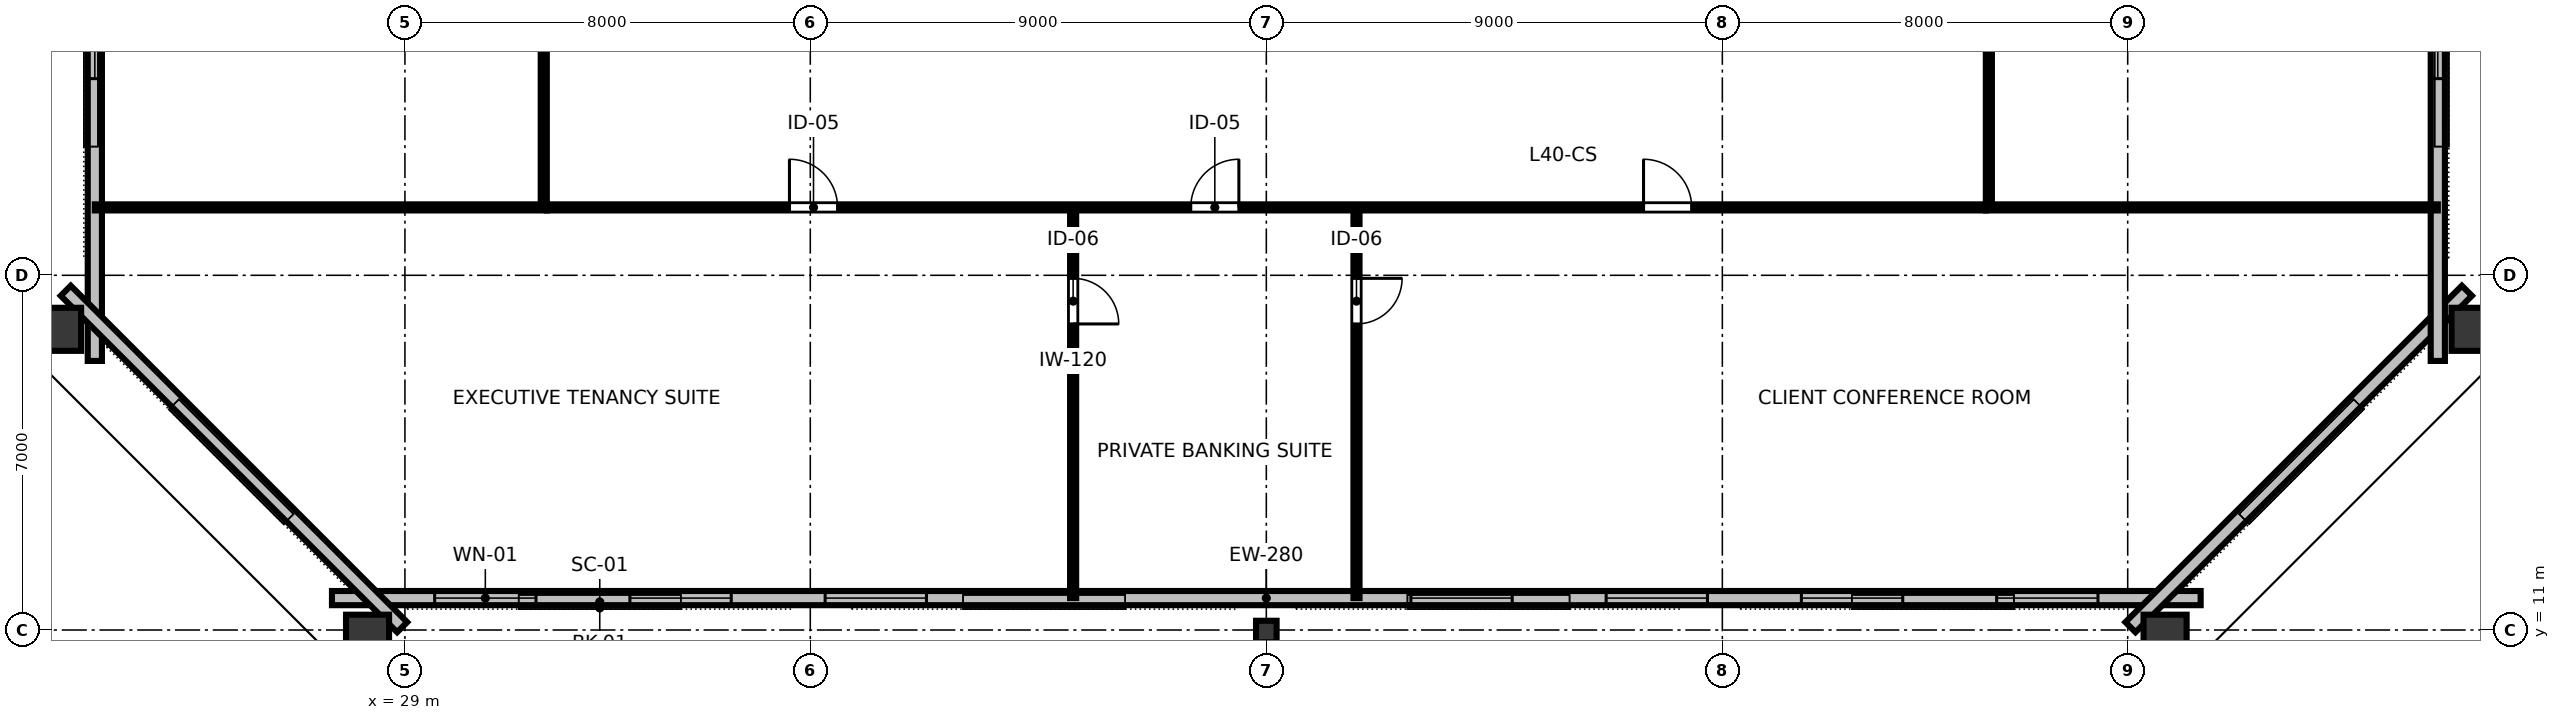
"""IFC4 building model, lengths in metres.
Left out: names, types, materials, properties, quantities, classifications, styles, units other than length and angle.
Written with IfcOpenShell. Run it as: python <this file> out.ifc"""

import sys

from ifc_helpers import new_model, si_unit, direction, frame, frame_2d, origin, origin_2d, place, context, subcontext, project, spatial, rectangle, hollow_rectangle, i_section, extrude, element, fill, save


model = new_model("IFC4")
c1 = context("Model", 3, precision=1e-05, world=origin(), true_north=direction((0.0, 1.0)))
c2 = subcontext(c1, "Body", "Model", "MODEL_VIEW")
j1 = project(units=[si_unit("LENGTHUNIT", "METRE"), si_unit("PLANEANGLEUNIT", "RADIAN")], contexts=[c1])
p1 = place(None, origin())
s1 = spatial("IfcSite", under=j1, at=p1, CompositionType="ELEMENT")
p2 = place(p1, origin())
s2 = spatial("IfcBuilding", under=s1, at=p2, CompositionType="ELEMENT")
p3 = place(p2, frame((0.0, 0.0, 152.8)))
s3 = spatial("IfcBuildingStorey", under=s2, at=p3, CompositionType="ELEMENT", Elevation=152.8)
p4 = place(p3, frame((28.262, 10.802, 0.0), z_axis=(0.0, 0.0, 1.0), x_axis=(1.0, 0.0, 0.0)))
e1 = element("IfcColumn", 1, at=p4, inside=s3, PredefinedType="COLUMN", context=c2, shape_type="SweptSolid", body=[
    extrude(hollow_rectangle(XDim=0.85, YDim=1.0, WallThickness=0.05, at=origin_2d()), origin(), (0.0, 0.0, 1.0), 3.358),
])
p5 = place(p3, frame((46.0, 10.97, 0.0), z_axis=(0.0, 0.0, 1.0), x_axis=(1.0, 0.0, 0.0)))
e2 = element("IfcColumn", 2, at=p5, inside=s3, PredefinedType="COLUMN", context=c2, shape_type="SweptSolid", body=[
    extrude(i_section(OverallWidth=0.406, OverallDepth=0.425, WebThickness=0.033, FlangeThickness=0.052, FilletRadius=0.025, at=origin_2d()), origin(), (0.0, 0.0, 1.0), 3.358),
])
for number, where, z_axis, x_axis in (
    (3, (63.738, 10.802, 0.0), (0.0, 0.0, 1.0), (1.0, 0.0, 0.0)),
    (4, (69.891, 16.934, 0.0), (0.0, 0.0, 1.0), (0.0, 1.0, 0.0)),
    (5, (22.109, 16.934, 0.0), (0.0, 0.0, 1.0), (0.0, 1.0, 0.0)),
):
    element("IfcColumn", number, at=place(p3, frame(where, z_axis=z_axis, x_axis=x_axis)), inside=s3, PredefinedType="COLUMN", context=c2, shape_type="SweptSolid", body=[
        extrude(hollow_rectangle(XDim=0.85, YDim=1.0, WallThickness=0.05, at=origin_2d()), origin(), (0.0, 0.0, 1.0), 3.358),
    ])
p6 = place(p3, frame((27.56, 11.63, 0.0), z_axis=(0.0, 0.0, 1.0), x_axis=(1.0, 0.0, 0.0)))
e6 = element("IfcWall", 6, at=p6, inside=s3, PredefinedType="STANDARD", context=c2, shape_type="SweptSolid", body=[
    extrude(rectangle(XDim=36.88, YDim=0.28, at=frame_2d((18.44, 0.0))), origin(), (0.0, 0.0, 1.0), 3.36),
])
p7 = place(p6, frame((2.027, 0.0, 0.8)))
e7 = element("IfcOpeningElement", 7, at=p7, cuts=e6, PredefinedType="OPENING", context=c2, shape_type="SweptSolid", body=[
    extrude(rectangle(XDim=2.0, YDim=1.95, at=frame_2d((1.0, 0.975))), frame((0.0, 0.15, 0.0), z_axis=(0.0, -1.0, 0.0), x_axis=(1.0, 0.0, 0.0)), (0.0, 0.0, 1.0), 0.3),
])
p8 = place(p6, frame((5.88, 0.0, 0.8)))
e8 = element("IfcOpeningElement", 8, at=p8, cuts=e6, PredefinedType="OPENING", context=c2, shape_type="SweptSolid", body=[
    extrude(rectangle(XDim=2.0, YDim=1.95, at=frame_2d((1.0, 0.975))), frame((0.0, 0.15, 0.0), z_axis=(0.0, -1.0, 0.0), x_axis=(1.0, 0.0, 0.0)), (0.0, 0.0, 1.0), 0.3),
])
p9 = place(p6, frame((9.733, 0.0, 0.8)))
e9 = element("IfcOpeningElement", 9, at=p9, cuts=e6, PredefinedType="OPENING", context=c2, shape_type="SweptSolid", body=[
    extrude(rectangle(XDim=2.0, YDim=1.95, at=frame_2d((1.0, 0.975))), frame((0.0, 0.15, 0.0), z_axis=(0.0, -1.0, 0.0), x_axis=(1.0, 0.0, 0.0)), (0.0, 0.0, 1.0), 0.3),
])
p10 = place(p6, frame((21.293, 0.0, 0.8)))
e10 = element("IfcOpeningElement", 10, at=p10, cuts=e6, PredefinedType="OPENING", context=c2, shape_type="SweptSolid", body=[
    extrude(rectangle(XDim=2.0, YDim=1.95, at=frame_2d((1.0, 0.975))), frame((0.0, 0.15, 0.0), z_axis=(0.0, -1.0, 0.0), x_axis=(1.0, 0.0, 0.0)), (0.0, 0.0, 1.0), 0.3),
])
p11 = place(p6, frame((25.147, 0.0, 0.8)))
e11 = element("IfcOpeningElement", 11, at=p11, cuts=e6, PredefinedType="OPENING", context=c2, shape_type="SweptSolid", body=[
    extrude(rectangle(XDim=2.0, YDim=1.95, at=frame_2d((1.0, 0.975))), frame((0.0, 0.15, 0.0), z_axis=(0.0, -1.0, 0.0), x_axis=(1.0, 0.0, 0.0)), (0.0, 0.0, 1.0), 0.3),
])
p12 = place(p6, frame((29.0, 0.0, 0.8)))
e12 = element("IfcOpeningElement", 12, at=p12, cuts=e6, PredefinedType="OPENING", context=c2, shape_type="SweptSolid", body=[
    extrude(rectangle(XDim=2.0, YDim=1.95, at=frame_2d((1.0, 0.975))), frame((0.0, 0.15, 0.0), z_axis=(0.0, -1.0, 0.0), x_axis=(1.0, 0.0, 0.0)), (0.0, 0.0, 1.0), 0.3),
])
p13 = place(p6, frame((32.853, 0.0, 0.8)))
e13 = element("IfcOpeningElement", 13, at=p13, cuts=e6, PredefinedType="OPENING", context=c2, shape_type="SweptSolid", body=[
    extrude(rectangle(XDim=2.0, YDim=1.95, at=frame_2d((1.0, 0.975))), frame((0.0, 0.15, 0.0), z_axis=(0.0, -1.0, 0.0), x_axis=(1.0, 0.0, 0.0)), (0.0, 0.0, 1.0), 0.3),
])
p14 = place(p3, frame((63.054, 11.056, 0.0), z_axis=(0.0, 0.0, 1.0), x_axis=(0.707106781187, 0.707106781187, 0.0)))
e14 = element("IfcWall", 14, at=p14, inside=s3, PredefinedType="STANDARD", context=c2, shape_type="SweptSolid", body=[
    extrude(rectangle(XDim=9.39, YDim=0.28, at=frame_2d((4.695, 0.0))), origin(), (0.0, 0.0, 1.0), 3.36),
])
p15 = place(p3, frame((69.12, 16.31, 0.0), z_axis=(0.0, 0.0, 1.0), x_axis=(0.0, 1.0, 0.0)))
e15 = element("IfcWall", 15, at=p15, inside=s3, PredefinedType="STANDARD", context=c2, shape_type="SweptSolid", body=[
    extrude(rectangle(XDim=31.38, YDim=0.28, at=frame_2d((15.69, 0.0))), origin(), (0.0, 0.0, 1.0), 3.36),
])
p16 = place(p15, frame((5.571, 0.0, 0.8)))
e16 = element("IfcOpeningElement", 16, at=p16, cuts=e15, PredefinedType="OPENING", context=c2, shape_type="SweptSolid", body=[
    extrude(rectangle(XDim=2.0, YDim=1.95, at=frame_2d((1.0, 0.975))), frame((0.0, 0.15, 0.0), z_axis=(0.0, -1.0, 0.0), x_axis=(1.0, 0.0, 0.0)), (0.0, 0.0, 1.0), 0.3),
])
p17 = place(p15, frame((9.219, 0.0, 0.8)))
e17 = element("IfcOpeningElement", 17, at=p17, cuts=e15, PredefinedType="OPENING", context=c2, shape_type="SweptSolid", body=[
    extrude(rectangle(XDim=2.0, YDim=1.95, at=frame_2d((1.0, 0.975))), frame((0.0, 0.15, 0.0), z_axis=(0.0, -1.0, 0.0), x_axis=(1.0, 0.0, 0.0)), (0.0, 0.0, 1.0), 0.3),
])
p18 = place(p15, frame((20.161, 0.0, 0.8)))
e18 = element("IfcOpeningElement", 18, at=p18, cuts=e15, PredefinedType="OPENING", context=c2, shape_type="SweptSolid", body=[
    extrude(rectangle(XDim=2.0, YDim=1.95, at=frame_2d((1.0, 0.975))), frame((0.0, 0.15, 0.0), z_axis=(0.0, -1.0, 0.0), x_axis=(1.0, 0.0, 0.0)), (0.0, 0.0, 1.0), 0.3),
])
p19 = place(p15, frame((23.809, 0.0, 0.8)))
e19 = element("IfcOpeningElement", 19, at=p19, cuts=e15, PredefinedType="OPENING", context=c2, shape_type="SweptSolid", body=[
    extrude(rectangle(XDim=2.0, YDim=1.95, at=frame_2d((1.0, 0.975))), frame((0.0, 0.15, 0.0), z_axis=(0.0, -1.0, 0.0), x_axis=(1.0, 0.0, 0.0)), (0.0, 0.0, 1.0), 0.3),
])
p20 = place(p3, frame((22.88, 47.69, 0.0), z_axis=(0.0, 0.0, 1.0), x_axis=(0.0, -1.0, 0.0)))
e20 = element("IfcWall", 20, at=p20, inside=s3, PredefinedType="STANDARD", context=c2, shape_type="SweptSolid", body=[
    extrude(rectangle(XDim=31.38, YDim=0.28, at=frame_2d((15.69, 0.0))), origin(), (0.0, 0.0, 1.0), 3.36),
])
p21 = place(p20, frame((5.571, 0.0, 0.8)))
e21 = element("IfcOpeningElement", 21, at=p21, cuts=e20, PredefinedType="OPENING", context=c2, shape_type="SweptSolid", body=[
    extrude(rectangle(XDim=2.0, YDim=1.95, at=frame_2d((1.0, 0.975))), frame((0.0, 0.15, 0.0), z_axis=(0.0, -1.0, 0.0), x_axis=(1.0, 0.0, 0.0)), (0.0, 0.0, 1.0), 0.3),
])
p22 = place(p20, frame((20.161, 0.0, 0.8)))
e22 = element("IfcOpeningElement", 22, at=p22, cuts=e20, PredefinedType="OPENING", context=c2, shape_type="SweptSolid", body=[
    extrude(rectangle(XDim=2.0, YDim=1.95, at=frame_2d((1.0, 0.975))), frame((0.0, 0.15, 0.0), z_axis=(0.0, -1.0, 0.0), x_axis=(1.0, 0.0, 0.0)), (0.0, 0.0, 1.0), 0.3),
])
p23 = place(p20, frame((23.809, 0.0, 0.8)))
e23 = element("IfcOpeningElement", 23, at=p23, cuts=e20, PredefinedType="OPENING", context=c2, shape_type="SweptSolid", body=[
    extrude(rectangle(XDim=2.0, YDim=1.95, at=frame_2d((1.0, 0.975))), frame((0.0, 0.15, 0.0), z_axis=(0.0, -1.0, 0.0), x_axis=(1.0, 0.0, 0.0)), (0.0, 0.0, 1.0), 0.3),
])
p24 = place(p3, frame((22.306, 17.696, 0.0), z_axis=(0.0, 0.0, 1.0), x_axis=(0.707106781187, -0.707106781187, 0.0)))
e24 = element("IfcWall", 24, at=p24, inside=s3, PredefinedType="STANDARD", context=c2, shape_type="SweptSolid", body=[
    extrude(rectangle(XDim=9.39, YDim=0.28, at=frame_2d((4.695, 0.0))), origin(), (0.0, 0.0, 1.0), 3.36),
])
p25 = place(p3, frame((42.188, 19.34, 0.0), z_axis=(0.0, 0.0, 1.0), x_axis=(0.0, -1.0, 0.0)))
e25 = element("IfcWall", 25, at=p25, inside=s3, PredefinedType="PARTITIONING", context=c2, shape_type="SweptSolid", body=[
    extrude(rectangle(XDim=7.71, YDim=0.12, at=frame_2d((3.855, 0.0))), origin(), (0.0, 0.0, 1.0), 2.64),
])
p26 = place(p25, frame((1.4, 0.0, 0.0)))
e26 = element("IfcOpeningElement", 26, at=p26, cuts=e25, PredefinedType="OPENING", context=c2, shape_type="SweptSolid", body=[
    extrude(rectangle(XDim=0.9, YDim=2.15, at=frame_2d((0.45, 1.075))), frame((0.0, 0.07, 0.0), z_axis=(0.0, -1.0, 0.0), x_axis=(1.0, 0.0, 0.0)), (0.0, 0.0, 1.0), 0.14),
])
p27 = place(p3, frame((47.78, 19.34, 0.0), z_axis=(0.0, 0.0, 1.0), x_axis=(0.0, -1.0, 0.0)))
e27 = element("IfcWall", 27, at=p27, inside=s3, PredefinedType="PARTITIONING", context=c2, shape_type="SweptSolid", body=[
    extrude(rectangle(XDim=7.71, YDim=0.12, at=frame_2d((3.855, 0.0))), origin(), (0.0, 0.0, 1.0), 2.64),
])
p28 = place(p27, frame((1.4, 0.0, 0.0)))
e28 = element("IfcOpeningElement", 28, at=p28, cuts=e27, PredefinedType="OPENING", context=c2, shape_type="SweptSolid", body=[
    extrude(rectangle(XDim=0.9, YDim=2.15, at=frame_2d((0.45, 1.075))), frame((0.0, 0.07, 0.0), z_axis=(0.0, -1.0, 0.0), x_axis=(1.0, 0.0, 0.0)), (0.0, 0.0, 1.0), 0.14),
])
p29 = place(p3, frame((31.8, 19.34, 0.0), z_axis=(0.0, 0.0, 1.0), x_axis=(1.0, 0.0, 0.0)))
e29 = element("IfcWall", 29, at=p29, inside=s3, PredefinedType="PARTITIONING", context=c2, shape_type="SweptSolid", body=[
    extrude(rectangle(XDim=28.4, YDim=0.12, at=frame_2d((14.2, 0.0))), origin(), (0.0, 0.0, 1.0), 2.64),
])
p30 = place(p29, frame((4.789, 0.0, 0.0)))
e30 = element("IfcOpeningElement", 30, at=p30, cuts=e29, PredefinedType="OPENING", context=c2, shape_type="SweptSolid", body=[
    extrude(rectangle(XDim=0.95, YDim=2.15, at=frame_2d((0.475, 1.075))), frame((0.0, 0.07, 0.0), z_axis=(0.0, -1.0, 0.0), x_axis=(1.0, 0.0, 0.0)), (0.0, 0.0, 1.0), 0.14),
])
p31 = place(p29, frame((12.708, 0.0, 0.0)))
e31 = element("IfcOpeningElement", 31, at=p31, cuts=e29, PredefinedType="OPENING", context=c2, shape_type="SweptSolid", body=[
    extrude(rectangle(XDim=0.95, YDim=2.15, at=frame_2d((0.475, 1.075))), frame((0.0, 0.07, 0.0), z_axis=(0.0, -1.0, 0.0), x_axis=(1.0, 0.0, 0.0)), (0.0, 0.0, 1.0), 0.14),
])
p32 = place(p29, frame((21.645, 0.0, 0.0)))
e32 = element("IfcOpeningElement", 32, at=p32, cuts=e29, PredefinedType="OPENING", context=c2, shape_type="SweptSolid", body=[
    extrude(rectangle(XDim=0.95, YDim=2.15, at=frame_2d((0.475, 1.075))), frame((0.0, 0.07, 0.0), z_axis=(0.0, -1.0, 0.0), x_axis=(1.0, 0.0, 0.0)), (0.0, 0.0, 1.0), 0.14),
])
p33 = place(p3, frame((31.74, 19.4, 0.0), z_axis=(0.0, 0.0, 1.0), x_axis=(0.0, 1.0, 0.0)))
e33 = element("IfcWall", 33, at=p33, inside=s3, PredefinedType="PARTITIONING", context=c2, shape_type="SweptSolid", body=[
    extrude(rectangle(XDim=11.58, YDim=0.12, at=frame_2d((5.79, 0.0))), origin(), (0.0, 0.0, 1.0), 2.64),
])
p34 = place(p33, frame((5.415, 0.0, 0.0)))
e34 = element("IfcOpeningElement", 34, at=p34, cuts=e33, PredefinedType="OPENING", context=c2, shape_type="SweptSolid", body=[
    extrude(rectangle(XDim=0.95, YDim=2.15, at=frame_2d((0.475, 1.075))), frame((0.0, 0.07, 0.0), z_axis=(0.0, -1.0, 0.0), x_axis=(1.0, 0.0, 0.0)), (0.0, 0.0, 1.0), 0.14),
])
p35 = place(p3, frame((60.26, 19.4, 0.0), z_axis=(0.0, 0.0, 1.0), x_axis=(0.0, 1.0, 0.0)))
e35 = element("IfcWall", 35, at=p35, inside=s3, PredefinedType="PARTITIONING", context=c2, shape_type="SweptSolid", body=[
    extrude(rectangle(XDim=11.58, YDim=0.12, at=frame_2d((5.79, 0.0))), origin(), (0.0, 0.0, 1.0), 2.64),
])
p36 = place(p35, frame((5.415, 0.0, 0.0)))
e36 = element("IfcOpeningElement", 36, at=p36, cuts=e35, PredefinedType="OPENING", context=c2, shape_type="SweptSolid", body=[
    extrude(rectangle(XDim=0.95, YDim=2.15, at=frame_2d((0.475, 1.075))), frame((0.0, 0.07, 0.0), z_axis=(0.0, -1.0, 0.0), x_axis=(1.0, 0.0, 0.0)), (0.0, 0.0, 1.0), 0.14),
])
for number, where, z_axis, x_axis in (
    (37, (31.8, 19.34, 0.0), (0.0, 0.0, 1.0), (-1.0, 0.0, 0.0)),
    (38, (60.2, 19.34, 0.0), (0.0, 0.0, 1.0), (1.0, 0.0, 0.0)),
):
    element("IfcWall", number, at=place(p3, frame(where, z_axis=z_axis, x_axis=x_axis)), inside=s3, PredefinedType="PARTITIONING", context=c2, shape_type="SweptSolid", body=[
        extrude(rectangle(XDim=8.92, YDim=0.12, at=frame_2d((4.46, 0.0))), origin(), (0.0, 0.0, 1.0), 2.64),
    ])
p37 = place(p7, origin())
e39 = element("IfcWindow", 39, at=p37, inside=s3, PartitioningType="SINGLE_PANEL", PredefinedType="WINDOW", context=c2, shape_type="SweptSolid", body=[
    extrude(rectangle(XDim=2.0, YDim=1.95, at=frame_2d((1.0, 0.975))), frame((0.0, 0.03, 0.0), z_axis=(0.0, -1.0, 0.0), x_axis=(1.0, 0.0, 0.0)), (0.0, 0.0, 1.0), 0.06),
])
fill(e7, e39)
p38 = place(p8, origin())
e40 = element("IfcWindow", 40, at=p38, inside=s3, PartitioningType="SINGLE_PANEL", PredefinedType="WINDOW", context=c2, shape_type="SweptSolid", body=[
    extrude(rectangle(XDim=2.0, YDim=1.95, at=frame_2d((1.0, 0.975))), frame((0.0, 0.03, 0.0), z_axis=(0.0, -1.0, 0.0), x_axis=(1.0, 0.0, 0.0)), (0.0, 0.0, 1.0), 0.06),
])
fill(e8, e40)
p39 = place(p9, origin())
e41 = element("IfcWindow", 41, at=p39, inside=s3, PartitioningType="SINGLE_PANEL", PredefinedType="WINDOW", context=c2, shape_type="SweptSolid", body=[
    extrude(rectangle(XDim=2.0, YDim=1.95, at=frame_2d((1.0, 0.975))), frame((0.0, 0.03, 0.0), z_axis=(0.0, -1.0, 0.0), x_axis=(1.0, 0.0, 0.0)), (0.0, 0.0, 1.0), 0.06),
])
fill(e9, e41)
p40 = place(p10, origin())
e42 = element("IfcWindow", 42, at=p40, inside=s3, PartitioningType="SINGLE_PANEL", PredefinedType="WINDOW", context=c2, shape_type="SweptSolid", body=[
    extrude(rectangle(XDim=2.0, YDim=1.95, at=frame_2d((1.0, 0.975))), frame((0.0, 0.03, 0.0), z_axis=(0.0, -1.0, 0.0), x_axis=(1.0, 0.0, 0.0)), (0.0, 0.0, 1.0), 0.06),
])
fill(e10, e42)
p41 = place(p11, origin())
e43 = element("IfcWindow", 43, at=p41, inside=s3, PartitioningType="SINGLE_PANEL", PredefinedType="WINDOW", context=c2, shape_type="SweptSolid", body=[
    extrude(rectangle(XDim=2.0, YDim=1.95, at=frame_2d((1.0, 0.975))), frame((0.0, 0.03, 0.0), z_axis=(0.0, -1.0, 0.0), x_axis=(1.0, 0.0, 0.0)), (0.0, 0.0, 1.0), 0.06),
])
fill(e11, e43)
p42 = place(p12, origin())
e44 = element("IfcWindow", 44, at=p42, inside=s3, PartitioningType="SINGLE_PANEL", PredefinedType="WINDOW", context=c2, shape_type="SweptSolid", body=[
    extrude(rectangle(XDim=2.0, YDim=1.95, at=frame_2d((1.0, 0.975))), frame((0.0, 0.03, 0.0), z_axis=(0.0, -1.0, 0.0), x_axis=(1.0, 0.0, 0.0)), (0.0, 0.0, 1.0), 0.06),
])
fill(e12, e44)
p43 = place(p13, origin())
e45 = element("IfcWindow", 45, at=p43, inside=s3, PartitioningType="SINGLE_PANEL", PredefinedType="WINDOW", context=c2, shape_type="SweptSolid", body=[
    extrude(rectangle(XDim=2.0, YDim=1.95, at=frame_2d((1.0, 0.975))), frame((0.0, 0.03, 0.0), z_axis=(0.0, -1.0, 0.0), x_axis=(1.0, 0.0, 0.0)), (0.0, 0.0, 1.0), 0.06),
])
fill(e13, e45)
p44 = place(p16, origin())
e46 = element("IfcWindow", 46, at=p44, inside=s3, PartitioningType="SINGLE_PANEL", PredefinedType="WINDOW", context=c2, shape_type="SweptSolid", body=[
    extrude(rectangle(XDim=2.0, YDim=1.95, at=frame_2d((1.0, 0.975))), frame((0.0, 0.03, 0.0), z_axis=(0.0, -1.0, 0.0), x_axis=(1.0, 0.0, 0.0)), (0.0, 0.0, 1.0), 0.06),
])
fill(e16, e46)
p45 = place(p23, origin())
e47 = element("IfcWindow", 47, at=p45, inside=s3, PartitioningType="SINGLE_PANEL", PredefinedType="WINDOW", context=c2, shape_type="SweptSolid", body=[
    extrude(rectangle(XDim=2.0, YDim=1.95, at=frame_2d((1.0, 0.975))), frame((0.0, 0.03, 0.0), z_axis=(0.0, -1.0, 0.0), x_axis=(1.0, 0.0, 0.0)), (0.0, 0.0, 1.0), 0.06),
])
fill(e23, e47)
p46 = place(p26, origin())
e48 = element("IfcDoor", 48, at=p46, inside=s3, OperationType="SINGLE_SWING_RIGHT", PredefinedType="DOOR", context=c2, shape_type="SweptSolid", body=[
    extrude(rectangle(XDim=0.9, YDim=2.15, at=frame_2d((0.45, 1.075))), frame((0.0, 0.025, 0.0), z_axis=(0.0, -1.0, 0.0), x_axis=(1.0, 0.0, 0.0)), (0.0, 0.0, 1.0), 0.05),
])
fill(e26, e48)
p47 = place(p28, origin())
e49 = element("IfcDoor", 49, at=p47, inside=s3, OperationType="SINGLE_SWING_LEFT", PredefinedType="DOOR", context=c2, shape_type="SweptSolid", body=[
    extrude(rectangle(XDim=0.9, YDim=2.15, at=frame_2d((0.45, 1.075))), frame((0.0, 0.025, 0.0), z_axis=(0.0, -1.0, 0.0), x_axis=(1.0, 0.0, 0.0)), (0.0, 0.0, 1.0), 0.05),
])
fill(e28, e49)
p48 = place(p30, origin())
e50 = element("IfcDoor", 50, at=p48, inside=s3, OperationType="SINGLE_SWING_LEFT", PredefinedType="DOOR", context=c2, shape_type="SweptSolid", body=[
    extrude(rectangle(XDim=0.95, YDim=2.15, at=frame_2d((0.475, 1.075))), frame((0.0, 0.025, 0.0), z_axis=(0.0, -1.0, 0.0), x_axis=(1.0, 0.0, 0.0)), (0.0, 0.0, 1.0), 0.05),
])
fill(e30, e50)
p49 = place(p31, origin())
e51 = element("IfcDoor", 51, at=p49, inside=s3, OperationType="SINGLE_SWING_RIGHT", PredefinedType="DOOR", context=c2, shape_type="SweptSolid", body=[
    extrude(rectangle(XDim=0.95, YDim=2.15, at=frame_2d((0.475, 1.075))), frame((0.0, 0.025, 0.0), z_axis=(0.0, -1.0, 0.0), x_axis=(1.0, 0.0, 0.0)), (0.0, 0.0, 1.0), 0.05),
])
fill(e31, e51)
p50 = place(p32, origin())
e52 = element("IfcDoor", 52, at=p50, inside=s3, OperationType="SINGLE_SWING_LEFT", PredefinedType="DOOR", context=c2, shape_type="SweptSolid", body=[
    extrude(rectangle(XDim=0.95, YDim=2.15, at=frame_2d((0.475, 1.075))), frame((0.0, 0.025, 0.0), z_axis=(0.0, -1.0, 0.0), x_axis=(1.0, 0.0, 0.0)), (0.0, 0.0, 1.0), 0.05),
])
fill(e32, e52)
save(model, sys.argv[1])
